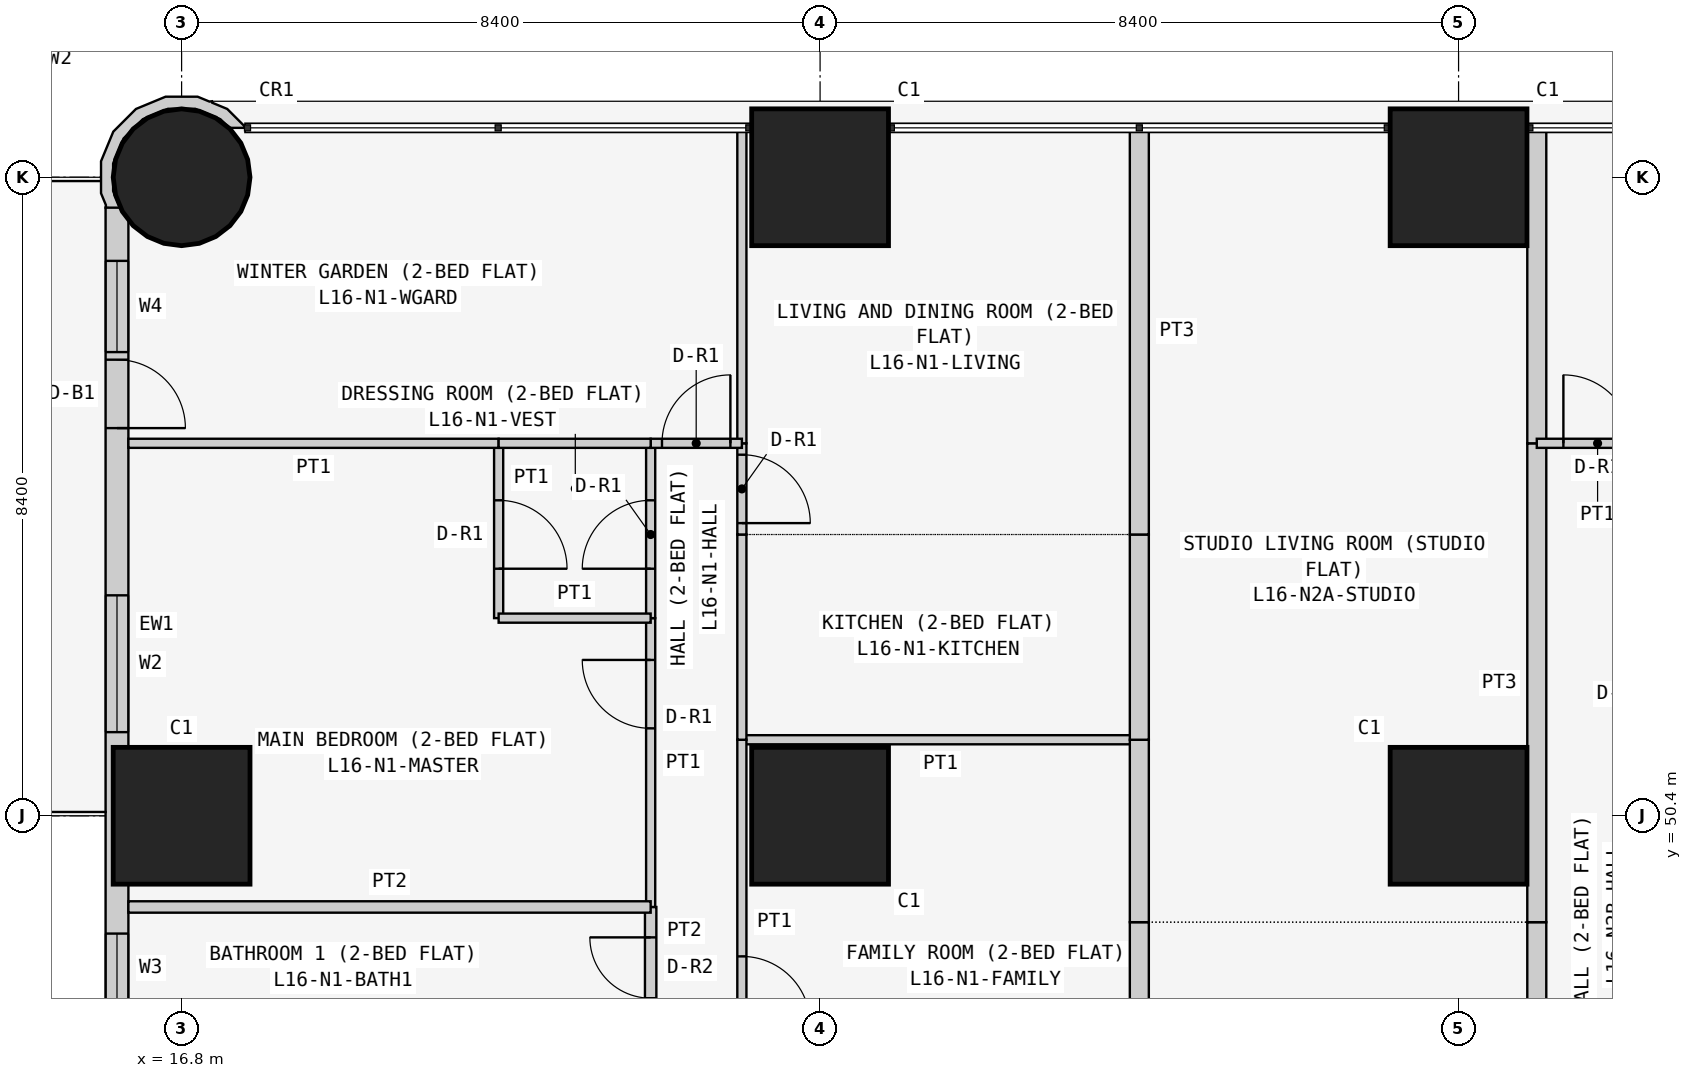
"""IFC4 building model, lengths in metres.
Left out: names, types, materials, properties, quantities, classifications, styles, units other than length and angle.
Written with IfcOpenShell. Run it as: python <this file> out.ifc"""

import sys

from ifc_helpers import new_model, si_unit, direction, frame, frame_2d, origin, origin_2d, place, context, subcontext, project, spatial, polyline, rectangle, circle, outline, extrude, element, fill, save


model = new_model("IFC4")
c1 = context("Model", 3, precision=1e-05, world=origin(), true_north=direction((0.0, 1.0)))
c2 = subcontext(c1, "Body", "Model", "MODEL_VIEW")
j1 = project(units=[si_unit("LENGTHUNIT", "METRE"), si_unit("PLANEANGLEUNIT", "RADIAN")], contexts=[c1])
p1 = place(None, origin())
s1 = spatial("IfcSite", under=j1, at=p1, CompositionType="ELEMENT")
p2 = place(p1, origin())
s2 = spatial("IfcBuilding", under=s1, at=p2, CompositionType="ELEMENT")
p3 = place(p2, frame((0.0, 0.0, 66.9)))
s3 = spatial("IfcBuildingStorey", under=s2, at=p3, CompositionType="ELEMENT", Elevation=66.9)
p4 = place(p3, frame((16.8, 50.4, 0.0), z_axis=(0.0, 0.0, 1.0), x_axis=(1.0, 0.0, 0.0)))
e1 = element("IfcColumn", 1, at=p4, inside=s3, PredefinedType="COLUMN", context=c2, shape_type="SweptSolid", body=[
    extrude(rectangle(XDim=1.8, YDim=1.8, at=origin_2d()), origin(), (0.0, 0.0, 1.0), 3.6),
])
p5 = place(p3, frame((16.8, 58.8, 0.0), z_axis=(0.0, 0.0, 1.0), x_axis=(1.0, 0.0, 0.0)))
e2 = element("IfcColumn", 2, at=p5, inside=s3, PredefinedType="COLUMN", context=c2, shape_type="SweptSolid", body=[
    extrude(circle(Radius=0.9, at=origin_2d()), origin(), (0.0, 0.0, 1.0), 3.6),
])
for number, where, z_axis, x_axis in (
    (3, (25.2, 50.4, 0.0), (0.0, 0.0, 1.0), (1.0, 0.0, 0.0)),
    (4, (25.2, 58.8, 0.0), (0.0, 0.0, 1.0), (1.0, 0.0, 0.0)),
    (5, (33.6, 50.4, 0.0), (0.0, 0.0, 1.0), (1.0, 0.0, 0.0)),
    (6, (33.6, 58.8, 0.0), (0.0, 0.0, 1.0), (1.0, 0.0, 0.0)),
):
    element("IfcColumn", number, at=place(p3, frame(where, z_axis=z_axis, x_axis=x_axis)), inside=s3, PredefinedType="COLUMN", context=c2, shape_type="SweptSolid", body=[
        extrude(rectangle(XDim=1.8, YDim=1.8, at=origin_2d()), origin(), (0.0, 0.0, 1.0), 3.6),
    ])
p6 = place(p3, frame((15.95, 58.4, 0.0), z_axis=(0.0, 0.0, 1.0), x_axis=(0.0, -1.0, 0.0)))
e7 = element("IfcWall", 7, at=p6, inside=s3, PredefinedType="SOLIDWALL", context=c2, shape_type="SweptSolid", body=[
    extrude(rectangle(XDim=15.7, YDim=0.3, at=frame_2d((7.85, 0.0))), origin(), (0.0, 0.0, 1.0), 3.45),
])
p7 = place(p6, frame((12.4, 0.0, 0.9)))
e8 = element("IfcOpeningElement", 8, at=p7, cuts=e7, PredefinedType="OPENING", context=c2, shape_type="SweptSolid", body=[
    extrude(rectangle(XDim=1.8, YDim=1.5, at=frame_2d((0.9, 0.75))), frame((0.0, 0.16, 0.0), z_axis=(0.0, -1.0, 0.0), x_axis=(1.0, 0.0, 0.0)), (0.0, 0.0, 1.0), 0.32),
])
p8 = place(p6, frame((9.55, 0.0, 1.5)))
e9 = element("IfcOpeningElement", 9, at=p8, cuts=e7, PredefinedType="OPENING", context=c2, shape_type="SweptSolid", body=[
    extrude(rectangle(XDim=0.9, YDim=0.7, at=frame_2d((0.45, 0.35))), frame((0.0, 0.16, 0.0), z_axis=(0.0, -1.0, 0.0), x_axis=(1.0, 0.0, 0.0)), (0.0, 0.0, 1.0), 0.32),
])
p9 = place(p6, frame((5.1, 0.0, 0.9)))
e10 = element("IfcOpeningElement", 10, at=p9, cuts=e7, PredefinedType="OPENING", context=c2, shape_type="SweptSolid", body=[
    extrude(rectangle(XDim=1.8, YDim=1.5, at=frame_2d((0.9, 0.75))), frame((0.0, 0.16, 0.0), z_axis=(0.0, -1.0, 0.0), x_axis=(1.0, 0.0, 0.0)), (0.0, 0.0, 1.0), 0.32),
])
p10 = place(p6, frame((2.0, 0.0, 0.0)))
e11 = element("IfcOpeningElement", 11, at=p10, cuts=e7, PredefinedType="OPENING", context=c2, shape_type="SweptSolid", body=[
    extrude(rectangle(XDim=0.9, YDim=2.4, at=frame_2d((0.45, 1.2))), frame((0.0, 0.16, 0.0), z_axis=(0.0, -1.0, 0.0), x_axis=(1.0, 0.0, 0.0)), (0.0, 0.0, 1.0), 0.32),
])
p11 = place(p6, frame((0.7, 0.0, 0.9)))
e12 = element("IfcOpeningElement", 12, at=p11, cuts=e7, PredefinedType="OPENING", context=c2, shape_type="SweptSolid", body=[
    extrude(rectangle(XDim=1.2, YDim=1.5, at=frame_2d((0.6, 0.75))), frame((0.0, 0.16, 0.0), z_axis=(0.0, -1.0, 0.0), x_axis=(1.0, 0.0, 0.0)), (0.0, 0.0, 1.0), 0.32),
])
p12 = place(p3, frame((17.567, 59.411, 0.0), z_axis=(0.0, 0.0, 1.0), x_axis=(-0.377204953059, 0.926129809145, 0.0)))
e13 = element("IfcWall", 13, at=p12, inside=s3, PredefinedType="SOLIDWALL", context=c2, shape_type="SweptSolid", body=[
    extrude(outline(polyline([(-0.27, 2.017), (-0.37, 1.841), (-0.102, 1.842), (0.23, 1.707), (0.484, 1.455), (0.624, 1.125), (0.626, 0.766), (0.491, 0.434), (0.239, 0.18), (0.09, 0.117), (0.011, -0.078), (0.024, -0.083), (0.329, 0.045), (0.48, 0.198), (0.499, 0.193), (0.508, 0.225), (0.626, 0.345), (0.785, 0.736), (0.782, 1.157), (0.619, 1.546), (0.319, 1.842), (-0.072, 2.002), (-0.24, 2.0), (-0.27, 2.017)])), origin(), (0.0, 0.0, 1.0), 3.45),
])
p13 = place(p3, frame((29.4, 51.4, 0.0), z_axis=(0.0, 0.0, 1.0), x_axis=(-1.0, 0.0, 0.0)))
e14 = element("IfcWall", 14, at=p13, inside=s3, PredefinedType="PARTITIONING", context=c2, shape_type="SweptSolid", body=[
    extrude(rectangle(XDim=5.229, YDim=0.12, at=frame_2d((2.615, 0.0))), origin(), (0.0, 0.0, 1.0), 3.45),
])
p14 = place(p3, frame((24.171, 51.4, 0.0), z_axis=(0.0, 0.0, 1.0), x_axis=(0.0, -1.0, 0.0)))
e15 = element("IfcWall", 15, at=p14, inside=s3, PredefinedType="PARTITIONING", context=c2, shape_type="SweptSolid", body=[
    extrude(rectangle(XDim=4.8, YDim=0.12, at=frame_2d((2.4, 0.0))), origin(), (0.0, 0.0, 1.0), 3.45),
])
p15 = place(p14, frame((2.85, 0.0, 0.0)))
e16 = element("IfcOpeningElement", 16, at=p15, cuts=e15, PredefinedType="OPENING", context=c2, shape_type="SweptSolid", body=[
    extrude(rectangle(XDim=0.9, YDim=2.1, at=frame_2d((0.45, 1.05))), frame((0.0, 0.07, 0.0), z_axis=(0.0, -1.0, 0.0), x_axis=(1.0, 0.0, 0.0)), (0.0, 0.0, 1.0), 0.14),
])
for number, where, z_axis, x_axis in (
    (17, (29.4, 46.6, 0.0), (0.0, 0.0, 1.0), (0.0, 1.0, 0.0)),
    (18, (29.4, 49.0, 0.0), (0.0, 0.0, 1.0), (0.0, 1.0, 0.0)),
):
    element("IfcWall", number, at=place(p3, frame(where, z_axis=z_axis, x_axis=x_axis)), inside=s3, PredefinedType="PARTITIONING", context=c2, shape_type="SweptSolid", body=[
        extrude(rectangle(XDim=2.4, YDim=0.25, at=frame_2d((1.2, 0.0))), origin(), (0.0, 0.0, 1.0), 2.848),
    ])
p16 = place(p3, frame((24.171, 54.1, 0.0), z_axis=(0.0, 0.0, 1.0), x_axis=(0.0, -1.0, 0.0)))
e19 = element("IfcWall", 19, at=p16, inside=s3, PredefinedType="PARTITIONING", context=c2, shape_type="SweptSolid", body=[
    extrude(rectangle(XDim=2.7, YDim=0.12, at=frame_2d((1.35, 0.0))), origin(), (0.0, 0.0, 1.0), 3.45),
])
p17 = place(p3, frame((29.4, 51.4, 0.0), z_axis=(0.0, 0.0, 1.0), x_axis=(0.0, 1.0, 0.0)))
e20 = element("IfcWall", 20, at=p17, inside=s3, PredefinedType="PARTITIONING", context=c2, shape_type="SweptSolid", body=[
    extrude(rectangle(XDim=2.7, YDim=0.25, at=frame_2d((1.35, 0.0))), origin(), (0.0, 0.0, 1.0), 2.848),
])
p18 = place(p3, frame((24.171, 55.3, 0.0), z_axis=(0.0, 0.0, 1.0), x_axis=(0.0, -1.0, 0.0)))
e21 = element("IfcWall", 21, at=p18, inside=s3, PredefinedType="PARTITIONING", context=c2, shape_type="SweptSolid", body=[
    extrude(rectangle(XDim=1.2, YDim=0.12, at=frame_2d((0.6, 0.0))), origin(), (0.0, 0.0, 1.0), 3.45),
])
p19 = place(p18, frame((0.15, 0.0, 0.0)))
e22 = element("IfcOpeningElement", 22, at=p19, cuts=e21, PredefinedType="OPENING", context=c2, shape_type="SweptSolid", body=[
    extrude(rectangle(XDim=0.9, YDim=2.1, at=frame_2d((0.45, 1.05))), frame((0.0, 0.07, 0.0), z_axis=(0.0, -1.0, 0.0), x_axis=(1.0, 0.0, 0.0)), (0.0, 0.0, 1.0), 0.14),
])
p20 = place(p3, frame((24.171, 59.45, 0.0), z_axis=(0.0, 0.0, 1.0), x_axis=(0.0, -1.0, 0.0)))
e23 = element("IfcWall", 23, at=p20, inside=s3, PredefinedType="PARTITIONING", context=c2, shape_type="SweptSolid", body=[
    extrude(rectangle(XDim=4.15, YDim=0.12, at=frame_2d((2.075, 0.0))), origin(), (0.0, 0.0, 1.0), 3.45),
])
p21 = place(p3, frame((29.4, 54.1, 0.0), z_axis=(0.0, 0.0, 1.0), x_axis=(0.0, 1.0, 0.0)))
e24 = element("IfcWall", 24, at=p21, inside=s3, PredefinedType="PARTITIONING", context=c2, shape_type="SweptSolid", body=[
    extrude(rectangle(XDim=5.35, YDim=0.25, at=frame_2d((2.675, 0.0))), origin(), (0.0, 0.0, 1.0), 2.848),
])
p22 = place(p3, frame((22.971, 49.2, 0.0), z_axis=(0.0, 0.0, 1.0), x_axis=(0.0, -1.0, 0.0)))
e25 = element("IfcWall", 25, at=p22, inside=s3, PredefinedType="PARTITIONING", context=c2, shape_type="SweptSolid", body=[
    extrude(rectangle(XDim=1.6, YDim=0.15, at=frame_2d((0.8, 0.0))), origin(), (0.0, 0.0, 1.0), 3.45),
])
p23 = place(p22, frame((0.4, 0.0, 0.0)))
e26 = element("IfcOpeningElement", 26, at=p23, cuts=e25, PredefinedType="OPENING", context=c2, shape_type="SweptSolid", body=[
    extrude(rectangle(XDim=0.8, YDim=2.1, at=frame_2d((0.4, 1.05))), frame((0.0, 0.085, 0.0), z_axis=(0.0, -1.0, 0.0), x_axis=(1.0, 0.0, 0.0)), (0.0, 0.0, 1.0), 0.17),
])
p24 = place(p3, frame((22.971, 53.0, 0.0), z_axis=(0.0, 0.0, 1.0), x_axis=(0.0, -1.0, 0.0)))
e27 = element("IfcWall", 27, at=p24, inside=s3, PredefinedType="PARTITIONING", context=c2, shape_type="SweptSolid", body=[
    extrude(rectangle(XDim=3.8, YDim=0.12, at=frame_2d((1.9, 0.0))), origin(), (0.0, 0.0, 1.0), 3.45),
])
p25 = place(p24, frame((0.55, 0.0, 0.0)))
e28 = element("IfcOpeningElement", 28, at=p25, cuts=e27, PredefinedType="OPENING", context=c2, shape_type="SweptSolid", body=[
    extrude(rectangle(XDim=0.9, YDim=2.1, at=frame_2d((0.45, 1.05))), frame((0.0, 0.07, 0.0), z_axis=(0.0, -1.0, 0.0), x_axis=(1.0, 0.0, 0.0)), (0.0, 0.0, 1.0), 0.14),
])
p26 = place(p3, frame((22.971, 55.3, 0.0), z_axis=(0.0, 0.0, 1.0), x_axis=(0.0, -1.0, 0.0)))
e29 = element("IfcWall", 29, at=p26, inside=s3, PredefinedType="PARTITIONING", context=c2, shape_type="SweptSolid", body=[
    extrude(rectangle(XDim=2.3, YDim=0.12, at=frame_2d((1.15, 0.0))), origin(), (0.0, 0.0, 1.0), 3.45),
])
p27 = place(p26, frame((0.75, 0.0, 0.0)))
e30 = element("IfcOpeningElement", 30, at=p27, cuts=e29, PredefinedType="OPENING", context=c2, shape_type="SweptSolid", body=[
    extrude(rectangle(XDim=0.9, YDim=2.1, at=frame_2d((0.45, 1.05))), frame((0.0, 0.07, 0.0), z_axis=(0.0, -1.0, 0.0), x_axis=(1.0, 0.0, 0.0)), (0.0, 0.0, 1.0), 0.14),
])
p28 = place(p3, frame((24.171, 55.3, 0.0), z_axis=(0.0, 0.0, 1.0), x_axis=(-1.0, 0.0, 0.0)))
e31 = element("IfcWall", 31, at=p28, inside=s3, PredefinedType="PARTITIONING", context=c2, shape_type="SweptSolid", body=[
    extrude(rectangle(XDim=1.2, YDim=0.12, at=frame_2d((0.6, 0.0))), origin(), (0.0, 0.0, 1.0), 3.45),
])
p29 = place(p28, frame((0.151, 0.0, 0.0)))
e32 = element("IfcOpeningElement", 32, at=p29, cuts=e31, PredefinedType="OPENING", context=c2, shape_type="SweptSolid", body=[
    extrude(rectangle(XDim=0.9, YDim=2.1, at=frame_2d((0.45, 1.05))), frame((0.0, 0.07, 0.0), z_axis=(0.0, -1.0, 0.0), x_axis=(1.0, 0.0, 0.0)), (0.0, 0.0, 1.0), 0.14),
])
p30 = place(p3, frame((22.971, 49.2, 0.0), z_axis=(0.0, 0.0, 1.0), x_axis=(-1.0, 0.0, 0.0)))
e33 = element("IfcWall", 33, at=p30, inside=s3, PredefinedType="PARTITIONING", context=c2, shape_type="SweptSolid", body=[
    extrude(rectangle(XDim=6.871, YDim=0.15, at=frame_2d((3.436, 0.0))), origin(), (0.0, 0.0, 1.0), 3.45),
])
p31 = place(p3, frame((20.971, 55.3, 0.0), z_axis=(0.0, 0.0, 1.0), x_axis=(0.0, -1.0, 0.0)))
e34 = element("IfcWall", 34, at=p31, inside=s3, PredefinedType="PARTITIONING", context=c2, shape_type="SweptSolid", body=[
    extrude(rectangle(XDim=2.3, YDim=0.12, at=frame_2d((1.15, 0.0))), origin(), (0.0, 0.0, 1.0), 2.848),
])
p32 = place(p31, frame((0.75, 0.0, 0.0)))
e35 = element("IfcOpeningElement", 35, at=p32, cuts=e34, PredefinedType="OPENING", context=c2, shape_type="SweptSolid", body=[
    extrude(rectangle(XDim=0.9, YDim=2.1, at=frame_2d((0.45, 1.05))), frame((0.0, 0.07, 0.0), z_axis=(0.0, -1.0, 0.0), x_axis=(1.0, 0.0, 0.0)), (0.0, 0.0, 1.0), 0.14),
])
p33 = place(p3, frame((20.971, 53.0, 0.0), z_axis=(0.0, 0.0, 1.0), x_axis=(1.0, 0.0, 0.0)))
e36 = element("IfcWall", 36, at=p33, inside=s3, PredefinedType="PARTITIONING", context=c2, shape_type="SweptSolid", body=[
    extrude(rectangle(XDim=2.0, YDim=0.12, at=frame_2d((1.0, 0.0))), origin(), (0.0, 0.0, 1.0), 3.45),
])
p34 = place(p3, frame((16.1, 55.3, 0.0), z_axis=(0.0, 0.0, 1.0), x_axis=(1.0, 0.0, 0.0)))
e37 = element("IfcWall", 37, at=p34, inside=s3, PredefinedType="PARTITIONING", context=c2, shape_type="SweptSolid", body=[
    extrude(rectangle(XDim=4.871, YDim=0.12, at=frame_2d((2.436, 0.0))), origin(), (0.0, 0.0, 1.0), 3.45),
])
p35 = place(p3, frame((22.971, 55.3, 0.0), z_axis=(0.0, 0.0, 1.0), x_axis=(-1.0, 0.0, 0.0)))
e38 = element("IfcWall", 38, at=p35, inside=s3, PredefinedType="PARTITIONING", context=c2, shape_type="SweptSolid", body=[
    extrude(rectangle(XDim=2.0, YDim=0.12, at=frame_2d((1.0, 0.0))), origin(), (0.0, 0.0, 1.0), 3.45),
])
p36 = place(p3, frame((34.629, 49.0, 0.0), z_axis=(0.0, 0.0, 1.0), x_axis=(0.0, -1.0, 0.0)))
e39 = element("IfcWall", 39, at=p36, inside=s3, PredefinedType="PARTITIONING", context=c2, shape_type="SweptSolid", body=[
    extrude(rectangle(XDim=3.6, YDim=0.25, at=frame_2d((1.8, 0.0))), origin(), (0.0, 0.0, 1.0), 3.45),
])
p37 = place(p3, frame((34.629, 55.3, 0.0), z_axis=(0.0, 0.0, 1.0), x_axis=(0.0, -1.0, 0.0)))
e40 = element("IfcWall", 40, at=p37, inside=s3, PredefinedType="PARTITIONING", context=c2, shape_type="SweptSolid", body=[
    extrude(rectangle(XDim=6.3, YDim=0.25, at=frame_2d((3.15, 0.0))), origin(), (0.0, 0.0, 1.0), 3.45),
])
p38 = place(p3, frame((34.629, 59.45, 0.0), z_axis=(0.0, 0.0, 1.0), x_axis=(0.0, -1.0, 0.0)))
e41 = element("IfcWall", 41, at=p38, inside=s3, PredefinedType="PARTITIONING", context=c2, shape_type="SweptSolid", body=[
    extrude(rectangle(XDim=4.15, YDim=0.25, at=frame_2d((2.075, 0.0))), origin(), (0.0, 0.0, 1.0), 3.45),
])
p39 = place(p3, frame((34.629, 55.3, 0.0), z_axis=(0.0, 0.0, 1.0), x_axis=(1.0, 0.0, 0.0)))
e42 = element("IfcWall", 42, at=p39, inside=s3, PredefinedType="PARTITIONING", context=c2, shape_type="SweptSolid", body=[
    extrude(rectangle(XDim=1.6, YDim=0.12, at=frame_2d((0.8, 0.0))), origin(), (0.0, 0.0, 1.0), 3.45),
])
p40 = place(p39, frame((0.35, 0.0, 0.0)))
e43 = element("IfcOpeningElement", 43, at=p40, cuts=e42, PredefinedType="OPENING", context=c2, shape_type="SweptSolid", body=[
    extrude(rectangle(XDim=0.9, YDim=2.1, at=frame_2d((0.45, 1.05))), frame((0.0, 0.07, 0.0), z_axis=(0.0, -1.0, 0.0), x_axis=(1.0, 0.0, 0.0)), (0.0, 0.0, 1.0), 0.14),
])
p41 = place(p8, origin())
e44 = element("IfcWindow", 44, at=p41, inside=s3, PartitioningType="SINGLE_PANEL", PredefinedType="WINDOW", context=c2, shape_type="SweptSolid", body=[
    extrude(rectangle(XDim=0.9, YDim=0.7, at=frame_2d((0.45, 0.35))), frame((0.0, 0.03, 0.0), z_axis=(0.0, -1.0, 0.0), x_axis=(1.0, 0.0, 0.0)), (0.0, 0.0, 1.0), 0.06),
])
fill(e9, e44)
p42 = place(p9, origin())
e45 = element("IfcWindow", 45, at=p42, inside=s3, PartitioningType="SINGLE_PANEL", PredefinedType="WINDOW", context=c2, shape_type="SweptSolid", body=[
    extrude(rectangle(XDim=1.8, YDim=1.5, at=frame_2d((0.9, 0.75))), frame((0.0, 0.03, 0.0), z_axis=(0.0, -1.0, 0.0), x_axis=(1.0, 0.0, 0.0)), (0.0, 0.0, 1.0), 0.06),
])
fill(e10, e45)
p43 = place(p10, origin())
e46 = element("IfcDoor", 46, at=p43, inside=s3, OperationType="SINGLE_SWING_RIGHT", PredefinedType="DOOR", context=c2, shape_type="SweptSolid", body=[
    extrude(rectangle(XDim=0.9, YDim=2.4, at=frame_2d((0.45, 1.2))), frame((0.0, 0.025, 0.0), z_axis=(0.0, -1.0, 0.0), x_axis=(1.0, 0.0, 0.0)), (0.0, 0.0, 1.0), 0.05),
])
fill(e11, e46)
p44 = place(p11, origin())
e47 = element("IfcWindow", 47, at=p44, inside=s3, PartitioningType="SINGLE_PANEL", PredefinedType="WINDOW", context=c2, shape_type="SweptSolid", body=[
    extrude(rectangle(XDim=1.2, YDim=1.5, at=frame_2d((0.6, 0.75))), frame((0.0, 0.03, 0.0), z_axis=(0.0, -1.0, 0.0), x_axis=(1.0, 0.0, 0.0)), (0.0, 0.0, 1.0), 0.06),
])
fill(e12, e47)
p45 = place(p15, origin())
e48 = element("IfcDoor", 48, at=p45, inside=s3, OperationType="SINGLE_SWING_RIGHT", PredefinedType="DOOR", context=c2, shape_type="SweptSolid", body=[
    extrude(rectangle(XDim=0.9, YDim=2.1, at=frame_2d((0.45, 1.05))), frame((0.0, 0.025, 0.0), z_axis=(0.0, -1.0, 0.0), x_axis=(1.0, 0.0, 0.0)), (0.0, 0.0, 1.0), 0.05),
])
fill(e16, e48)
p46 = place(p19, origin())
e49 = element("IfcDoor", 49, at=p46, inside=s3, OperationType="SINGLE_SWING_RIGHT", PredefinedType="DOOR", context=c2, shape_type="SweptSolid", body=[
    extrude(rectangle(XDim=0.9, YDim=2.1, at=frame_2d((0.45, 1.05))), frame((0.0, 0.025, 0.0), z_axis=(0.0, -1.0, 0.0), x_axis=(1.0, 0.0, 0.0)), (0.0, 0.0, 1.0), 0.05),
])
fill(e22, e49)
p47 = place(p23, frame((0.8, 0.0, 0.0), z_axis=(0.0, 0.0, 1.0), x_axis=(-1.0, 0.0, 0.0)))
e50 = element("IfcDoor", 50, at=p47, inside=s3, OperationType="SINGLE_SWING_RIGHT", PredefinedType="DOOR", context=c2, shape_type="SweptSolid", body=[
    extrude(rectangle(XDim=0.8, YDim=2.1, at=frame_2d((0.4, 1.05))), frame((0.0, 0.025, 0.0), z_axis=(0.0, -1.0, 0.0), x_axis=(1.0, 0.0, 0.0)), (0.0, 0.0, 1.0), 0.05),
])
fill(e26, e50)
p48 = place(p25, frame((0.9, 0.0, 0.0), z_axis=(0.0, 0.0, 1.0), x_axis=(-1.0, 0.0, 0.0)))
e51 = element("IfcDoor", 51, at=p48, inside=s3, OperationType="SINGLE_SWING_RIGHT", PredefinedType="DOOR", context=c2, shape_type="SweptSolid", body=[
    extrude(rectangle(XDim=0.9, YDim=2.1, at=frame_2d((0.45, 1.05))), frame((0.0, 0.025, 0.0), z_axis=(0.0, -1.0, 0.0), x_axis=(1.0, 0.0, 0.0)), (0.0, 0.0, 1.0), 0.05),
])
fill(e28, e51)
p49 = place(p27, frame((0.9, 0.0, 0.0), z_axis=(0.0, 0.0, 1.0), x_axis=(-1.0, 0.0, 0.0)))
e52 = element("IfcDoor", 52, at=p49, inside=s3, OperationType="SINGLE_SWING_LEFT", PredefinedType="DOOR", context=c2, shape_type="SweptSolid", body=[
    extrude(rectangle(XDim=0.9, YDim=2.1, at=frame_2d((0.45, 1.05))), frame((0.0, 0.025, 0.0), z_axis=(0.0, -1.0, 0.0), x_axis=(1.0, 0.0, 0.0)), (0.0, 0.0, 1.0), 0.05),
])
fill(e30, e52)
p50 = place(p32, origin())
e53 = element("IfcDoor", 53, at=p50, inside=s3, OperationType="SINGLE_SWING_RIGHT", PredefinedType="DOOR", context=c2, shape_type="SweptSolid", body=[
    extrude(rectangle(XDim=0.9, YDim=2.1, at=frame_2d((0.45, 1.05))), frame((0.0, 0.025, 0.0), z_axis=(0.0, -1.0, 0.0), x_axis=(1.0, 0.0, 0.0)), (0.0, 0.0, 1.0), 0.05),
])
fill(e35, e53)
p51 = place(p29, frame((0.9, 0.0, 0.0), z_axis=(0.0, 0.0, 1.0), x_axis=(-1.0, 0.0, 0.0)))
e54 = element("IfcDoor", 54, at=p51, inside=s3, OperationType="SINGLE_SWING_RIGHT", PredefinedType="DOOR", context=c2, shape_type="SweptSolid", body=[
    extrude(rectangle(XDim=0.9, YDim=2.1, at=frame_2d((0.45, 1.05))), frame((0.0, 0.025, 0.0), z_axis=(0.0, -1.0, 0.0), x_axis=(1.0, 0.0, 0.0)), (0.0, 0.0, 1.0), 0.05),
])
fill(e32, e54)
p52 = place(p40, origin())
e55 = element("IfcDoor", 55, at=p52, inside=s3, OperationType="SINGLE_SWING_LEFT", PredefinedType="DOOR", context=c2, shape_type="SweptSolid", body=[
    extrude(rectangle(XDim=0.9, YDim=2.1, at=frame_2d((0.45, 1.05))), frame((0.0, 0.025, 0.0), z_axis=(0.0, -1.0, 0.0), x_axis=(1.0, 0.0, 0.0)), (0.0, 0.0, 1.0), 0.05),
])
fill(e43, e55)
save(model, sys.argv[1])
